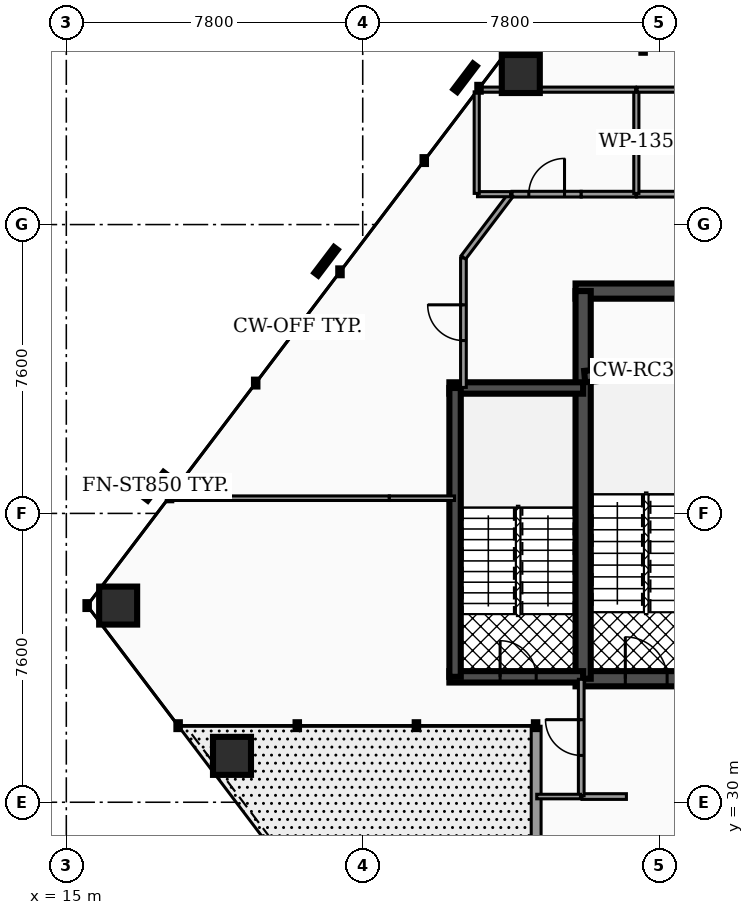
"""IFC4 building model, lengths in metres.
Left out: names, types, materials, properties, quantities, classifications, styles, units other than length and angle.
Written with IfcOpenShell. Run it as: python <this file> out.ifc"""

import sys

from ifc_helpers import new_model, si_unit, direction, frame, frame_2d, origin, origin_2d, place, context, subcontext, project, spatial, rectangle, hollow_rectangle, extrude, element, fill, save


model = new_model("IFC4")
c1 = context("Model", 3, precision=1e-05, world=origin(), true_north=direction((0.0, 1.0)))
c2 = subcontext(c1, "Body", "Model", "MODEL_VIEW")
j1 = project(units=[si_unit("LENGTHUNIT", "METRE"), si_unit("PLANEANGLEUNIT", "RADIAN")], contexts=[c1])
p1 = place(None, origin())
s1 = spatial("IfcSite", under=j1, at=p1, CompositionType="ELEMENT")
p2 = place(p1, origin())
s2 = spatial("IfcBuilding", under=s1, at=p2, CompositionType="ELEMENT")
p3 = place(p2, frame((0.0, 0.0, 64.26)))
s3 = spatial("IfcBuildingStorey", under=s2, at=p3, CompositionType="ELEMENT", Elevation=64.26)
p4 = place(p3, frame((28.4, 43.45, 0.0), z_axis=(0.0, 0.0, 1.0), x_axis=(1.0, 0.0, 0.0)))
e1 = element("IfcWall", 1, at=p4, inside=s3, PredefinedType="SHEAR", context=c2, shape_type="SweptSolid", body=[
    extrude(rectangle(XDim=20.06, YDim=0.4, at=frame_2d((10.03, 0.0))), origin(), (0.0, 0.0, 1.0), 3.82),
])
p5 = place(p3, frame((28.4, 33.25, 0.0), z_axis=(0.0, 0.0, 1.0), x_axis=(1.0, 0.0, 0.0)))
e2 = element("IfcWall", 2, at=p5, inside=s3, PredefinedType="SHEAR", context=c2, shape_type="SweptSolid", body=[
    extrude(rectangle(XDim=20.06, YDim=0.4, at=frame_2d((10.03, 0.0))), origin(), (0.0, 0.0, 1.0), 3.82),
])
p6 = place(p5, frame((4.03, 0.0, 0.0)))
e3 = element("IfcOpeningElement", 3, at=p6, cuts=e2, PredefinedType="OPENING", context=c2, shape_type="SweptSolid", body=[
    extrude(rectangle(XDim=1.1, YDim=2.15, at=frame_2d((0.55, 1.075))), frame((0.0, 0.21, 0.0), z_axis=(0.0, -1.0, 0.0), x_axis=(1.0, 0.0, 0.0)), (0.0, 0.0, 1.0), 0.42),
])
p7 = place(p5, frame((14.87, 0.0, 0.0)))
e4 = element("IfcOpeningElement", 4, at=p7, cuts=e2, PredefinedType="OPENING", context=c2, shape_type="SweptSolid", body=[
    extrude(rectangle(XDim=1.1, YDim=2.15, at=frame_2d((0.55, 1.075))), frame((0.0, 0.21, 0.0), z_axis=(0.0, -1.0, 0.0), x_axis=(1.0, 0.0, 0.0)), (0.0, 0.0, 1.0), 0.42),
])
p8 = place(p5, frame((1.31, 0.0, 0.0)))
e5 = element("IfcOpeningElement", 5, at=p8, cuts=e2, PredefinedType="OPENING", context=c2, shape_type="SweptSolid", body=[
    extrude(rectangle(XDim=1.1, YDim=2.2, at=frame_2d((0.55, 1.1))), frame((0.0, 0.21, 0.0), z_axis=(0.0, -1.0, 0.0), x_axis=(1.0, 0.0, 0.0)), (0.0, 0.0, 1.0), 0.42),
])
p9 = place(p5, frame((9.44, 0.0, 0.0)))
e6 = element("IfcOpeningElement", 6, at=p9, cuts=e2, PredefinedType="OPENING", context=c2, shape_type="SweptSolid", body=[
    extrude(rectangle(XDim=1.12, YDim=2.05, at=frame_2d((0.56, 1.025))), frame((0.0, 0.21, 0.0), z_axis=(0.0, -1.0, 0.0), x_axis=(1.0, 0.0, 0.0)), (0.0, 0.0, 1.0), 0.42),
])
p10 = place(p5, frame((17.65, 0.0, 0.0)))
e7 = element("IfcOpeningElement", 7, at=p10, cuts=e2, PredefinedType="OPENING", context=c2, shape_type="SweptSolid", body=[
    extrude(rectangle(XDim=1.1, YDim=2.2, at=frame_2d((0.55, 1.1))), frame((0.0, 0.21, 0.0), z_axis=(0.0, -1.0, 0.0), x_axis=(1.0, 0.0, 0.0)), (0.0, 0.0, 1.0), 0.42),
])
p11 = place(p3, frame((28.6, 33.25, 0.0), z_axis=(0.0, 0.0, 1.0), x_axis=(0.0, 1.0, 0.0)))
e8 = element("IfcWall", 8, at=p11, inside=s3, PredefinedType="SHEAR", context=c2, shape_type="SweptSolid", body=[
    extrude(rectangle(XDim=10.2, YDim=0.4, at=frame_2d((5.1, 0.0))), origin(), (0.0, 0.0, 1.0), 3.82),
])
p12 = place(p3, frame((28.64, 41.2, 0.0), z_axis=(0.0, 0.0, 1.0), x_axis=(0.995687118776, 0.092774789157, 0.0)))
e9 = element("IfcWall", 9, at=p12, inside=s3, PredefinedType="SHEAR", context=c2, shape_type="SweptSolid", body=[
    extrude(rectangle(XDim=3.234, YDim=0.3, at=frame_2d((1.617, 0.0))), origin(), (0.0, 0.0, 1.0), 3.82),
])
p13 = place(p3, frame((25.08, 40.9, 0.0), z_axis=(0.0, 0.0, 1.0), x_axis=(1.0, 0.0, 0.0)))
e10 = element("IfcWall", 10, at=p13, inside=s3, PredefinedType="SHEAR", context=c2, shape_type="SweptSolid", body=[
    extrude(rectangle(XDim=3.52, YDim=0.3, at=frame_2d((1.76, 0.0))), origin(), (0.0, 0.0, 1.0), 3.82),
])
p14 = place(p3, frame((25.08, 33.3, 0.0), z_axis=(0.0, 0.0, 1.0), x_axis=(1.0, 0.0, 0.0)))
e11 = element("IfcWall", 11, at=p14, inside=s3, PredefinedType="SHEAR", context=c2, shape_type="SweptSolid", body=[
    extrude(rectangle(XDim=3.52, YDim=0.3, at=frame_2d((1.76, 0.0))), origin(), (0.0, 0.0, 1.0), 3.82),
])
p15 = place(p14, frame((1.335, 0.0, 0.0)))
e12 = element("IfcOpeningElement", 12, at=p15, cuts=e11, PredefinedType="OPENING", context=c2, shape_type="SweptSolid", body=[
    extrude(rectangle(XDim=0.95, YDim=2.2, at=frame_2d((0.475, 1.1))), frame((0.0, 0.16, 0.0), z_axis=(0.0, -1.0, 0.0), x_axis=(1.0, 0.0, 0.0)), (0.0, 0.0, 1.0), 0.32),
])
p16 = place(p3, frame((25.23, 33.3, 0.0), z_axis=(0.0, 0.0, 1.0), x_axis=(0.0, 1.0, 0.0)))
e13 = element("IfcWall", 13, at=p16, inside=s3, PredefinedType="SHEAR", context=c2, shape_type="SweptSolid", body=[
    extrude(rectangle(XDim=7.6, YDim=0.3, at=frame_2d((3.8, 0.0))), origin(), (0.0, 0.0, 1.0), 3.82),
])
for number, where, z_axis, x_axis in (
    (14, (26.96, 49.161, 0.0), (0.0, 0.0, 1.0), (1.0, 0.0, 0.0)),
    (15, (16.364, 35.175, 0.0), (0.0, 0.0, 1.0), (1.0, 0.0, 0.0)),
):
    element("IfcColumn", number, at=place(p3, frame(where, z_axis=z_axis, x_axis=x_axis)), inside=s3, PredefinedType="COLUMN", context=c2, shape_type="SweptSolid", body=[
        extrude(hollow_rectangle(XDim=1.0, YDim=1.0, WallThickness=0.05, at=origin_2d()), origin(), (0.0, 0.0, 1.0), 3.82),
    ])
p17 = place(p3, frame((19.36, 31.22, 0.0), z_axis=(0.0, 0.0, 1.0), x_axis=(1.0, 0.0, 0.0)))
e16 = element("IfcColumn", 16, at=p17, inside=s3, PredefinedType="COLUMN", context=c2, shape_type="SweptSolid", body=[
    extrude(hollow_rectangle(XDim=1.0, YDim=1.0, WallThickness=0.05, at=origin_2d()), origin(), (0.0, 0.0, 1.0), 4.04),
])
p18 = place(p3, frame((27.364, 22.707, 0.0), z_axis=(0.0, 0.0, 1.0), x_axis=(0.0, 1.0, 0.0)))
e17 = element("IfcWall", 17, at=p18, inside=s3, PredefinedType="STANDARD", context=c2, shape_type="SweptSolid", body=[
    extrude(rectangle(XDim=9.293, YDim=0.26, at=frame_2d((4.647, 0.0))), origin(), (0.0, 0.0, 1.0), 3.65),
])
p19 = place(p18, frame((0.55, 0.0, 0.0)))
e18 = element("IfcOpeningElement", 18, at=p19, cuts=e17, PredefinedType="OPENING", context=c2, shape_type="SweptSolid", body=[
    extrude(rectangle(XDim=1.8, YDim=2.2, at=frame_2d((0.9, 1.1))), frame((0.0, 0.14, 0.0), z_axis=(0.0, -1.0, 0.0), x_axis=(1.0, 0.0, 0.0)), (0.0, 0.0, 1.0), 0.28),
])
p20 = place(p18, frame((3.05, 0.0, 0.75)))
e19 = element("IfcOpeningElement", 19, at=p20, cuts=e17, PredefinedType="OPENING", context=c2, shape_type="SweptSolid", body=[
    extrude(rectangle(XDim=1.6, YDim=1.95, at=frame_2d((0.8, 0.975))), frame((0.0, 0.14, 0.0), z_axis=(0.0, -1.0, 0.0), x_axis=(1.0, 0.0, 0.0)), (0.0, 0.0, 1.0), 0.28),
])
p21 = place(p3, frame((28.57, 30.15, 0.0), z_axis=(0.0, 0.0, 1.0), x_axis=(1.0, 0.0, 0.0)))
e20 = element("IfcWall", 20, at=p21, inside=s3, PredefinedType="PARTITIONING", context=c2, shape_type="SweptSolid", body=[
    extrude(rectangle(XDim=1.168, YDim=0.15, at=frame_2d((0.584, 0.0))), origin(), (0.0, 0.0, 1.0), 2.777),
])
p22 = place(p3, frame((28.55, 30.17, 0.0), z_axis=(0.0, 0.0, 1.0), x_axis=(0.0, 1.0, 0.0)))
e21 = element("IfcWall", 21, at=p22, inside=s3, PredefinedType="PARTITIONING", context=c2, shape_type="SweptSolid", body=[
    extrude(rectangle(XDim=3.065, YDim=0.15, at=frame_2d((1.533, 0.0))), origin(), (0.0, 0.0, 1.0), 2.777),
])
p23 = place(p22, frame((1.062, 0.0, 0.0)))
e22 = element("IfcOpeningElement", 22, at=p23, cuts=e21, PredefinedType="OPENING", context=c2, shape_type="SweptSolid", body=[
    extrude(rectangle(XDim=0.94, YDim=2.05, at=frame_2d((0.47, 1.025))), frame((0.0, 0.085, 0.0), z_axis=(0.0, -1.0, 0.0), x_axis=(1.0, 0.0, 0.0)), (0.0, 0.0, 1.0), 0.17),
])
p24 = place(p3, frame((26.73, 46.0, 0.0), z_axis=(0.0, 0.0, 1.0), x_axis=(1.0, 0.0, 0.0)))
e23 = element("IfcWall", 23, at=p24, inside=s3, PredefinedType="PARTITIONING", context=c2, shape_type="SweptSolid", body=[
    extrude(rectangle(XDim=1.82, YDim=0.15, at=frame_2d((0.91, 0.0))), origin(), (0.0, 0.0, 1.0), 2.777),
])
p25 = place(p24, frame((0.44, 0.0, 0.0)))
e24 = element("IfcOpeningElement", 24, at=p25, cuts=e23, PredefinedType="OPENING", context=c2, shape_type="SweptSolid", body=[
    extrude(rectangle(XDim=0.94, YDim=2.05, at=frame_2d((0.47, 1.025))), frame((0.0, 0.085, 0.0), z_axis=(0.0, -1.0, 0.0), x_axis=(1.0, 0.0, 0.0)), (0.0, 0.0, 1.0), 0.17),
])
p26 = place(p3, frame((28.55, 46.0, 0.0), z_axis=(0.0, 0.0, 1.0), x_axis=(1.0, 0.0, 0.0)))
e25 = element("IfcWall", 25, at=p26, inside=s3, PredefinedType="PARTITIONING", context=c2, shape_type="SweptSolid", body=[
    extrude(rectangle(XDim=1.445, YDim=0.15, at=frame_2d((0.723, 0.0))), origin(), (0.0, 0.0, 1.0), 2.777),
])
p27 = place(p3, frame((30.005, 46.0, 0.0), z_axis=(0.0, 0.0, 1.0), x_axis=(1.0, 0.0, 0.0)))
e26 = element("IfcWall", 26, at=p27, inside=s3, PredefinedType="PARTITIONING", context=c2, shape_type="SweptSolid", body=[
    extrude(rectangle(XDim=4.19, YDim=0.15, at=frame_2d((2.095, 0.0))), origin(), (0.0, 0.0, 1.0), 2.777),
])
p28 = place(p27, frame((1.625, 0.0, 0.0)))
e27 = element("IfcOpeningElement", 27, at=p28, cuts=e26, PredefinedType="OPENING", context=c2, shape_type="SweptSolid", body=[
    extrude(rectangle(XDim=0.94, YDim=2.05, at=frame_2d((0.47, 1.025))), frame((0.0, 0.085, 0.0), z_axis=(0.0, -1.0, 0.0), x_axis=(1.0, 0.0, 0.0)), (0.0, 0.0, 1.0), 0.17),
])
p29 = place(p3, frame((25.45, 40.915, 0.0), z_axis=(0.0, 0.0, 1.0), x_axis=(0.0, 1.0, 0.0)))
e28 = element("IfcWall", 28, at=p29, inside=s3, PredefinedType="PARTITIONING", context=c2, shape_type="SweptSolid", body=[
    extrude(rectangle(XDim=3.406, YDim=0.15, at=frame_2d((1.703, 0.0))), origin(), (0.0, 0.0, 1.0), 2.777),
])
p30 = place(p29, frame((1.233, 0.0, 0.0)))
e29 = element("IfcOpeningElement", 29, at=p30, cuts=e28, PredefinedType="OPENING", context=c2, shape_type="SweptSolid", body=[
    extrude(rectangle(XDim=0.94, YDim=2.05, at=frame_2d((0.47, 1.025))), frame((0.0, 0.085, 0.0), z_axis=(0.0, -1.0, 0.0), x_axis=(1.0, 0.0, 0.0)), (0.0, 0.0, 1.0), 0.17),
])
p31 = place(p3, frame((25.45, 44.337, 0.0), z_axis=(0.0, 0.0, 1.0), x_axis=(0.603848590911, 0.797099039803, 0.0)))
e30 = element("IfcWall", 30, at=p31, inside=s3, PredefinedType="PARTITIONING", context=c2, shape_type="SweptSolid", body=[
    extrude(rectangle(XDim=2.067, YDim=0.15, at=frame_2d((1.033, 0.0))), origin(), (0.0, 0.0, 1.0), 2.777),
])
p32 = place(p3, frame((30.0, 46.02, 0.0), z_axis=(0.0, 0.0, 1.0), x_axis=(0.0, 1.0, 0.0)))
e31 = element("IfcWall", 31, at=p32, inside=s3, PredefinedType="PARTITIONING", context=c2, shape_type="SweptSolid", body=[
    extrude(rectangle(XDim=2.71, YDim=0.135, at=frame_2d((1.355, 0.0))), origin(), (0.0, 0.0, 1.0), 2.777),
])
p33 = place(p3, frame((25.82, 46.0, 0.0), z_axis=(0.0, 0.0, 1.0), x_axis=(1.0, 0.0, 0.0)))
e32 = element("IfcWall", 32, at=p33, inside=s3, PredefinedType="PARTITIONING", context=c2, shape_type="SweptSolid", body=[
    extrude(rectangle(XDim=0.87, YDim=0.135, at=frame_2d((0.435, 0.0))), origin(), (0.0, 0.0, 1.0), 2.777),
])
p34 = place(p3, frame((25.8, 46.02, 0.0), z_axis=(0.0, 0.0, 1.0), x_axis=(0.0, 1.0, 0.0)))
e33 = element("IfcWall", 33, at=p34, inside=s3, PredefinedType="PARTITIONING", context=c2, shape_type="SweptSolid", body=[
    extrude(rectangle(XDim=2.672, YDim=0.135, at=frame_2d((1.336, 0.0))), origin(), (0.0, 0.0, 1.0), 2.777),
])
p35 = place(p3, frame((25.848, 48.75, 0.0), z_axis=(0.0, 0.0, 1.0), x_axis=(1.0, 0.0, 0.0)))
e34 = element("IfcWall", 34, at=p35, inside=s3, PredefinedType="PARTITIONING", context=c2, shape_type="SweptSolid", body=[
    extrude(rectangle(XDim=4.132, YDim=0.135, at=frame_2d((2.066, 0.0))), origin(), (0.0, 0.0, 1.0), 2.777),
])
p36 = place(p3, frame((30.02, 48.75, 0.0), z_axis=(0.0, 0.0, 1.0), x_axis=(1.0, 0.0, 0.0)))
e35 = element("IfcWall", 35, at=p36, inside=s3, PredefinedType="PARTITIONING", context=c2, shape_type="SweptSolid", body=[
    extrude(rectangle(XDim=4.16, YDim=0.135, at=frame_2d((2.08, 0.0))), origin(), (0.0, 0.0, 1.0), 2.777),
])
p37 = place(p3, frame((27.379, 30.15, 0.0), z_axis=(0.0, 0.0, 1.0), x_axis=(1.0, 0.0, 0.0)))
e36 = element("IfcWall", 36, at=p37, inside=s3, PredefinedType="PARTITIONING", context=c2, shape_type="SweptSolid", body=[
    extrude(rectangle(XDim=1.151, YDim=0.12, at=frame_2d((0.576, 0.0))), origin(), (0.0, 0.0, 1.0), 2.777),
])
p38 = place(p3, frame((17.704, 38.0, 0.0), z_axis=(0.0, 0.0, 1.0), x_axis=(1.0, 0.0, 0.0)))
e37 = element("IfcWall", 37, at=p38, inside=s3, PredefinedType="PARTITIONING", context=c2, shape_type="SweptSolid", body=[
    extrude(rectangle(XDim=5.796, YDim=0.12, at=frame_2d((2.898, 0.0))), origin(), (0.0, 0.0, 1.0), 2.777),
])
p39 = place(p3, frame((23.5, 38.0, 0.0), z_axis=(0.0, 0.0, 1.0), x_axis=(1.0, 0.0, 0.0)))
e38 = element("IfcWall", 38, at=p39, inside=s3, PredefinedType="PARTITIONING", context=c2, shape_type="SweptSolid", body=[
    extrude(rectangle(XDim=1.715, YDim=0.12, at=frame_2d((0.857, 0.0))), origin(), (0.0, 0.0, 1.0), 2.777),
])
p40 = place(p8, origin())
e39 = element("IfcDoor", 39, at=p40, inside=s3, OperationType="SINGLE_SWING_LEFT", PredefinedType="DOOR", context=c2, shape_type="SweptSolid", body=[
    extrude(rectangle(XDim=1.1, YDim=2.2, at=frame_2d((0.55, 1.1))), frame((0.0, 0.025, 0.0), z_axis=(0.0, -1.0, 0.0), x_axis=(1.0, 0.0, 0.0)), (0.0, 0.0, 1.0), 0.05),
])
fill(e5, e39)
p41 = place(p15, origin())
e40 = element("IfcDoor", 40, at=p41, inside=s3, OperationType="SINGLE_SWING_LEFT", PredefinedType="DOOR", context=c2, shape_type="SweptSolid", body=[
    extrude(rectangle(XDim=0.95, YDim=2.2, at=frame_2d((0.475, 1.1))), frame((0.0, 0.025, 0.0), z_axis=(0.0, -1.0, 0.0), x_axis=(1.0, 0.0, 0.0)), (0.0, 0.0, 1.0), 0.05),
])
fill(e12, e40)
p42 = place(p23, origin())
e41 = element("IfcDoor", 41, at=p42, inside=s3, OperationType="SINGLE_SWING_RIGHT", PredefinedType="DOOR", context=c2, shape_type="SweptSolid", body=[
    extrude(rectangle(XDim=0.94, YDim=2.05, at=frame_2d((0.47, 1.025))), frame((0.0, 0.025, 0.0), z_axis=(0.0, -1.0, 0.0), x_axis=(1.0, 0.0, 0.0)), (0.0, 0.0, 1.0), 0.05),
])
fill(e22, e41)
p43 = place(p25, origin())
e42 = element("IfcDoor", 42, at=p43, inside=s3, OperationType="SINGLE_SWING_RIGHT", PredefinedType="DOOR", context=c2, shape_type="SweptSolid", body=[
    extrude(rectangle(XDim=0.94, YDim=2.05, at=frame_2d((0.47, 1.025))), frame((0.0, 0.025, 0.0), z_axis=(0.0, -1.0, 0.0), x_axis=(1.0, 0.0, 0.0)), (0.0, 0.0, 1.0), 0.05),
])
fill(e24, e42)
p44 = place(p30, origin())
e43 = element("IfcDoor", 43, at=p44, inside=s3, OperationType="SINGLE_SWING_RIGHT", PredefinedType="DOOR", context=c2, shape_type="SweptSolid", body=[
    extrude(rectangle(XDim=0.94, YDim=2.05, at=frame_2d((0.47, 1.025))), frame((0.0, 0.025, 0.0), z_axis=(0.0, -1.0, 0.0), x_axis=(1.0, 0.0, 0.0)), (0.0, 0.0, 1.0), 0.05),
])
fill(e29, e43)
save(model, sys.argv[1])
